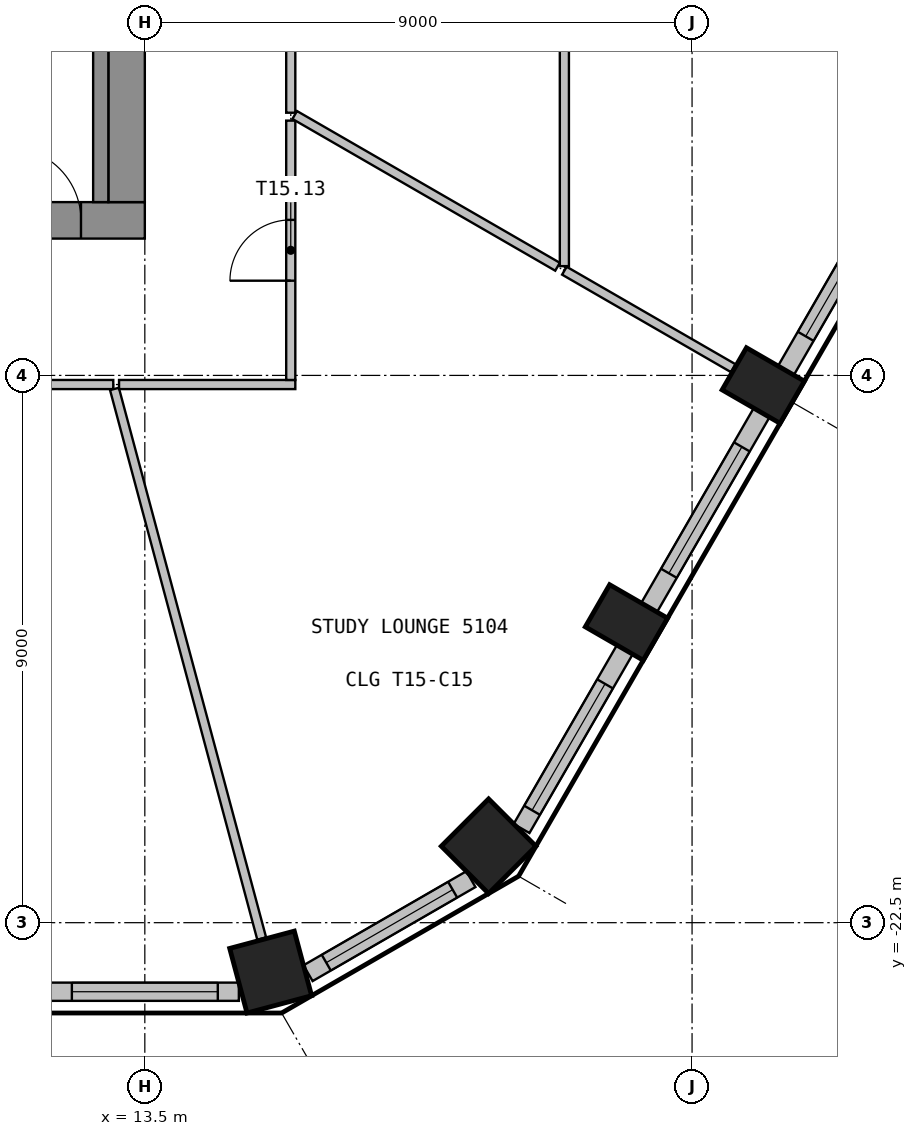
"""IFC4 building model, lengths in metres.
Left out: names, types, materials, properties, quantities, classifications, styles, units other than length and angle.
Written with IfcOpenShell. Run it as: python <this file> out.ifc"""

import sys

from ifc_helpers import new_model, si_unit, direction, frame, frame_2d, origin, origin_2d, place, context, subcontext, project, spatial, rectangle, extrude, element, fill, save


model = new_model("IFC4")
c1 = context("Model", 3, precision=1e-05, world=origin(), true_north=direction((0.0, 1.0)))
c2 = subcontext(c1, "Body", "Model", "MODEL_VIEW")
j1 = project(units=[si_unit("LENGTHUNIT", "METRE"), si_unit("PLANEANGLEUNIT", "RADIAN")], contexts=[c1])
p1 = place(None, origin())
s1 = spatial("IfcSite", under=j1, at=p1, CompositionType="ELEMENT")
p2 = place(p1, origin())
s2 = spatial("IfcBuilding", under=s1, at=p2, CompositionType="ELEMENT")
p3 = place(p2, frame((0.0, 0.0, 207.3)))
s3 = spatial("IfcBuildingStorey", under=s2, at=p3, CompositionType="ELEMENT", Elevation=207.3)
for number, where, z_axis, x_axis in (
    (1, (15.57, -23.312, 0.0), (0.0, 0.0, 1.0), (0.966, 0.259, 0.0)),
    (2, (19.154, -21.242, 0.0), (0.0, 0.0, 1.0), (0.707, 0.707, 0.0)),
):
    element("IfcColumn", number, at=place(p3, frame(where, z_axis=z_axis, x_axis=x_axis)), inside=s3, PredefinedType="COLUMN", context=c2, shape_type="SweptSolid", body=[
        extrude(rectangle(XDim=1.1, YDim=1.1, at=origin_2d()), origin(), (0.0, 0.0, 1.0), 3.55),
    ])
for number, where, z_axis, x_axis in (
    (3, (21.421, -17.563, 0.0), (0.0, 0.0, 1.0), (0.5, 0.866, 0.0)),
    (4, (23.671, -13.666, 0.0), (0.0, 0.0, 1.0), (0.5, 0.866, 0.0)),
):
    element("IfcColumn", number, at=place(p3, frame(where, z_axis=z_axis, x_axis=x_axis)), inside=s3, PredefinedType="COLUMN", context=c2, shape_type="SweptSolid", body=[
        extrude(rectangle(XDim=0.8, YDim=1.1, at=origin_2d()), origin(), (0.0, 0.0, 1.0), 3.55),
    ])
p4 = place(p3, frame((11.65, -23.635, 0.0), z_axis=(0.0, 0.0, 1.0), x_axis=(1.0, 0.0, 0.0)))
e5 = element("IfcWall", 5, at=p4, inside=s3, PredefinedType="SOLIDWALL", context=c2, shape_type="SweptSolid", body=[
    extrude(rectangle(XDim=3.396, YDim=0.3, at=frame_2d((1.698, 0.0))), origin(), (0.0, 0.0, 1.0), 3.55),
])
p5 = place(p4, frame((0.649, 0.0, 0.9)))
e6 = element("IfcOpeningElement", 6, at=p5, cuts=e5, PredefinedType="OPENING", context=c2, shape_type="SweptSolid", body=[
    extrude(rectangle(XDim=2.4, YDim=2.1, at=frame_2d((1.2, 1.05))), frame((0.0, 0.16, 0.0), z_axis=(0.0, -1.0, 0.0), x_axis=(1.0, 0.0, 0.0)), (0.0, 0.0, 1.0), 0.32),
])
p6 = place(p3, frame((16.184, -23.331, 0.0), z_axis=(0.0, 0.0, 1.0), x_axis=(0.865994975416, 0.500052699777, 0.0)))
e7 = element("IfcWall", 7, at=p6, inside=s3, PredefinedType="SOLIDWALL", context=c2, shape_type="SweptSolid", body=[
    extrude(rectangle(XDim=3.093, YDim=0.3, at=frame_2d((1.546, 0.0))), origin(), (0.0, 0.0, 1.0), 3.55),
])
p7 = place(p6, frame((0.346, 0.0, 0.9)))
e8 = element("IfcOpeningElement", 8, at=p7, cuts=e7, PredefinedType="OPENING", context=c2, shape_type="SweptSolid", body=[
    extrude(rectangle(XDim=2.4, YDim=2.1, at=frame_2d((1.2, 1.05))), frame((0.0, 0.16, 0.0), z_axis=(0.0, -1.0, 0.0), x_axis=(1.0, 0.0, 0.0)), (0.0, 0.0, 1.0), 0.32),
])
p8 = place(p3, frame((19.696, -20.951, 0.0), z_axis=(0.0, 0.0, 1.0), x_axis=(0.500012868213, 0.866017974191, 0.0)))
e9 = element("IfcWall", 9, at=p8, inside=s3, PredefinedType="SOLIDWALL", context=c2, shape_type="SweptSolid", body=[
    extrude(rectangle(XDim=3.396, YDim=0.3, at=frame_2d((1.698, 0.0))), origin(), (0.0, 0.0, 1.0), 3.55),
])
p9 = place(p8, frame((0.346, 0.0, 0.9)))
e10 = element("IfcOpeningElement", 10, at=p9, cuts=e9, PredefinedType="OPENING", context=c2, shape_type="SweptSolid", body=[
    extrude(rectangle(XDim=2.4, YDim=2.1, at=frame_2d((1.2, 1.05))), frame((0.0, 0.16, 0.0), z_axis=(0.0, -1.0, 0.0), x_axis=(1.0, 0.0, 0.0)), (0.0, 0.0, 1.0), 0.32),
])
p10 = place(p3, frame((21.794, -17.317, 0.0), z_axis=(0.0, 0.0, 1.0), x_axis=(0.500029062817, 0.866008623709, 0.0)))
e11 = element("IfcWall", 11, at=p10, inside=s3, PredefinedType="SOLIDWALL", context=c2, shape_type="SweptSolid", body=[
    extrude(rectangle(XDim=3.699, YDim=0.3, at=frame_2d((1.85, 0.0))), origin(), (0.0, 0.0, 1.0), 3.55),
])
p11 = place(p10, frame((0.649, 0.0, 0.9)))
e12 = element("IfcOpeningElement", 12, at=p11, cuts=e11, PredefinedType="OPENING", context=c2, shape_type="SweptSolid", body=[
    extrude(rectangle(XDim=2.4, YDim=2.1, at=frame_2d((1.2, 1.05))), frame((0.0, 0.16, 0.0), z_axis=(0.0, -1.0, 0.0), x_axis=(1.0, 0.0, 0.0)), (0.0, 0.0, 1.0), 0.32),
])
p12 = place(p3, frame((24.044, -13.419, 0.0), z_axis=(0.0, 0.0, 1.0), x_axis=(0.500029062817, 0.866008623709, 0.0)))
e13 = element("IfcWall", 13, at=p12, inside=s3, PredefinedType="SOLIDWALL", context=c2, shape_type="SweptSolid", body=[
    extrude(rectangle(XDim=3.699, YDim=0.3, at=frame_2d((1.85, 0.0))), origin(), (0.0, 0.0, 1.0), 3.55),
])
p13 = place(p12, frame((0.649, 0.0, 0.9)))
e14 = element("IfcOpeningElement", 14, at=p13, cuts=e13, PredefinedType="OPENING", context=c2, shape_type="SweptSolid", body=[
    extrude(rectangle(XDim=2.4, YDim=2.1, at=frame_2d((1.2, 1.05))), frame((0.0, 0.16, 0.0), z_axis=(0.0, -1.0, 0.0), x_axis=(1.0, 0.0, 0.0)), (0.0, 0.0, 1.0), 0.32),
])
p14 = place(p3, frame((-13.5, -10.95, 0.0), z_axis=(0.0, 0.0, 1.0), x_axis=(1.0, 0.0, 0.0)))
e15 = element("IfcWall", 15, at=p14, inside=s3, PredefinedType="SHEAR", context=c2, shape_type="SweptSolid", body=[
    extrude(rectangle(XDim=27.0, YDim=0.6, at=frame_2d((13.5, 0.0))), origin(), (0.0, 0.0, 1.0), 3.55),
])
p15 = place(p14, frame((12.3, 0.0, 0.0)))
e16 = element("IfcOpeningElement", 16, at=p15, cuts=e15, PredefinedType="OPENING", context=c2, shape_type="SweptSolid", body=[
    extrude(rectangle(XDim=2.4, YDim=2.1, at=frame_2d((1.2, 1.05))), frame((0.0, 0.31, 0.0), z_axis=(0.0, -1.0, 0.0), x_axis=(1.0, 0.0, 0.0)), (0.0, 0.0, 1.0), 0.62),
])
p16 = place(p14, frame((1.05, 0.0, 0.0)))
e17 = element("IfcOpeningElement", 17, at=p16, cuts=e15, PredefinedType="OPENING", context=c2, shape_type="SweptSolid", body=[
    extrude(rectangle(XDim=1.2, YDim=2.1, at=frame_2d((0.6, 1.05))), frame((0.0, 0.31, 0.0), z_axis=(0.0, -1.0, 0.0), x_axis=(1.0, 0.0, 0.0)), (0.0, 0.0, 1.0), 0.62),
])
p17 = place(p14, frame((24.75, 0.0, 0.0)))
e18 = element("IfcOpeningElement", 18, at=p17, cuts=e15, PredefinedType="OPENING", context=c2, shape_type="SweptSolid", body=[
    extrude(rectangle(XDim=1.2, YDim=2.1, at=frame_2d((0.6, 1.05))), frame((0.0, 0.31, 0.0), z_axis=(0.0, -1.0, 0.0), x_axis=(1.0, 0.0, 0.0)), (0.0, 0.0, 1.0), 0.62),
])
p18 = place(p3, frame((13.2, -10.65, 0.0), z_axis=(0.0, 0.0, 1.0), x_axis=(0.0, 1.0, 0.0)))
e19 = element("IfcWall", 19, at=p18, inside=s3, PredefinedType="SHEAR", context=c2, shape_type="SweptSolid", body=[
    extrude(rectangle(XDim=21.3, YDim=0.6, at=frame_2d((10.65, 0.0))), origin(), (0.0, 0.0, 1.0), 3.55),
])
p19 = place(p18, frame((9.45, 0.0, 0.0)))
e20 = element("IfcOpeningElement", 20, at=p19, cuts=e19, PredefinedType="OPENING", context=c2, shape_type="SweptSolid", body=[
    extrude(rectangle(XDim=2.4, YDim=2.1, at=frame_2d((1.2, 1.05))), frame((0.0, 0.31, 0.0), z_axis=(0.0, -1.0, 0.0), x_axis=(1.0, 0.0, 0.0)), (0.0, 0.0, 1.0), 0.62),
])
p20 = place(p3, frame((12.775, -10.65, 0.0), z_axis=(0.0, 0.0, 1.0), x_axis=(0.0, 1.0, 0.0)))
e21 = element("IfcWall", 21, at=p20, inside=s3, PredefinedType="SHEAR", context=c2, shape_type="SweptSolid", body=[
    extrude(rectangle(XDim=3.25, YDim=0.25, at=frame_2d((1.625, 0.0))), origin(), (0.0, 0.0, 1.0), 3.55),
])
p21 = place(p3, frame((2.25, -13.65, 0.0), z_axis=(0.0, 0.0, 1.0), x_axis=(1.0, 0.0, 0.0)))
e22 = element("IfcWall", 22, at=p21, inside=s3, PredefinedType="PARTITIONING", context=c2, shape_type="SweptSolid", body=[
    extrude(rectangle(XDim=10.731, YDim=0.15, at=frame_2d((5.365, 0.0))), origin(), (0.0, 0.0, 1.0), 3.55),
])
p22 = place(p21, frame((4.865, 0.0, 0.0)))
e23 = element("IfcOpeningElement", 23, at=p22, cuts=e22, PredefinedType="OPENING", context=c2, shape_type="SweptSolid", body=[
    extrude(rectangle(XDim=1.0, YDim=2.1, at=frame_2d((0.5, 1.05))), frame((0.0, 0.085, 0.0), z_axis=(0.0, -1.0, 0.0), x_axis=(1.0, 0.0, 0.0)), (0.0, 0.0, 1.0), 0.17),
])
p23 = place(p3, frame((13.0, -13.722, 0.0), z_axis=(0.0, 0.0, 1.0), x_axis=(0.258812157425, -0.96592767181, 0.0)))
e24 = element("IfcWall", 24, at=p23, inside=s3, PredefinedType="PARTITIONING", context=c2, shape_type="SweptSolid", body=[
    extrude(rectangle(XDim=9.358, YDim=0.15, at=frame_2d((4.679, 0.0))), origin(), (0.0, 0.0, 1.0), 3.55),
])
p24 = place(p3, frame((13.076, -13.65, 0.0), z_axis=(0.0, 0.0, 1.0), x_axis=(1.0, 0.0, 0.0)))
e25 = element("IfcWall", 25, at=p24, inside=s3, PredefinedType="PARTITIONING", context=c2, shape_type="SweptSolid", body=[
    extrude(rectangle(XDim=2.899, YDim=0.15, at=frame_2d((1.45, 0.0))), origin(), (0.0, 0.0, 1.0), 3.55),
])
p25 = place(p3, frame((15.9, -13.575, 0.0), z_axis=(0.0, 0.0, 1.0), x_axis=(0.0, 1.0, 0.0)))
e26 = element("IfcWall", 26, at=p25, inside=s3, PredefinedType="PARTITIONING", context=c2, shape_type="SweptSolid", body=[
    extrude(rectangle(XDim=4.265, YDim=0.15, at=frame_2d((2.132, 0.0))), origin(), (0.0, 0.0, 1.0), 3.55),
])
p26 = place(p25, frame((1.633, 0.0, 0.0)))
e27 = element("IfcOpeningElement", 27, at=p26, cuts=e26, PredefinedType="OPENING", context=c2, shape_type="SweptSolid", body=[
    extrude(rectangle(XDim=1.0, YDim=2.1, at=frame_2d((0.5, 1.05))), frame((0.0, 0.085, 0.0), z_axis=(0.0, -1.0, 0.0), x_axis=(1.0, 0.0, 0.0)), (0.0, 0.0, 1.0), 0.17),
])
p27 = place(p3, frame((15.9, -9.18, 0.0), z_axis=(0.0, 0.0, 1.0), x_axis=(0.0, 1.0, 0.0)))
e28 = element("IfcWall", 28, at=p27, inside=s3, PredefinedType="PARTITIONING", context=c2, shape_type="SweptSolid", body=[
    extrude(rectangle(XDim=7.005, YDim=0.15, at=frame_2d((3.502, 0.0))), origin(), (0.0, 0.0, 1.0), 3.55),
])
p28 = place(p27, frame((3.002, 0.0, 0.0)))
e29 = element("IfcOpeningElement", 29, at=p28, cuts=e28, PredefinedType="OPENING", context=c2, shape_type="SweptSolid", body=[
    extrude(rectangle(XDim=1.0, YDim=2.1, at=frame_2d((0.5, 1.05))), frame((0.0, 0.085, 0.0), z_axis=(0.0, -1.0, 0.0), x_axis=(1.0, 0.0, 0.0)), (0.0, 0.0, 1.0), 0.17),
])
p29 = place(p3, frame((15.965, -9.218, 0.0), z_axis=(0.0, 0.0, 1.0), x_axis=(0.866034070548, -0.499984988425, 0.0)))
e30 = element("IfcWall", 30, at=p29, inside=s3, PredefinedType="PARTITIONING", context=c2, shape_type="SweptSolid", body=[
    extrude(rectangle(XDim=4.991, YDim=0.15, at=frame_2d((2.496, 0.0))), origin(), (0.0, 0.0, 1.0), 3.55),
])
p30 = place(p3, frame((20.4, -2.325, 0.0), z_axis=(0.0, 0.0, 1.0), x_axis=(0.0, -1.0, 0.0)))
e31 = element("IfcWall", 31, at=p30, inside=s3, PredefinedType="PARTITIONING", context=c2, shape_type="SweptSolid", body=[
    extrude(rectangle(XDim=9.378, YDim=0.15, at=frame_2d((4.689, 0.0))), origin(), (0.0, 0.0, 1.0), 3.55),
])
p31 = place(p3, frame((20.4, -11.778, 0.0), z_axis=(0.0, 0.0, 1.0), x_axis=(0.866089241828, -0.499889412961, 0.0)))
e32 = element("IfcWall", 32, at=p31, inside=s3, PredefinedType="PARTITIONING", context=c2, shape_type="SweptSolid", body=[
    extrude(rectangle(XDim=3.207, YDim=0.15, at=frame_2d((1.604, 0.0))), origin(), (0.0, 0.0, 1.0), 3.55),
])
p32 = place(p5, origin())
e33 = element("IfcWindow", 33, at=p32, inside=s3, PartitioningType="SINGLE_PANEL", PredefinedType="WINDOW", context=c2, shape_type="SweptSolid", body=[
    extrude(rectangle(XDim=2.4, YDim=2.1, at=frame_2d((1.2, 1.05))), frame((0.0, 0.03, 0.0), z_axis=(0.0, -1.0, 0.0), x_axis=(1.0, 0.0, 0.0)), (0.0, 0.0, 1.0), 0.06),
])
fill(e6, e33)
p33 = place(p7, origin())
e34 = element("IfcWindow", 34, at=p33, inside=s3, PartitioningType="SINGLE_PANEL", PredefinedType="WINDOW", context=c2, shape_type="SweptSolid", body=[
    extrude(rectangle(XDim=2.4, YDim=2.1, at=frame_2d((1.2, 1.05))), frame((0.0, 0.03, 0.0), z_axis=(0.0, -1.0, 0.0), x_axis=(1.0, 0.0, 0.0)), (0.0, 0.0, 1.0), 0.06),
])
fill(e8, e34)
p34 = place(p9, origin())
e35 = element("IfcWindow", 35, at=p34, inside=s3, PartitioningType="SINGLE_PANEL", PredefinedType="WINDOW", context=c2, shape_type="SweptSolid", body=[
    extrude(rectangle(XDim=2.4, YDim=2.1, at=frame_2d((1.2, 1.05))), frame((0.0, 0.03, 0.0), z_axis=(0.0, -1.0, 0.0), x_axis=(1.0, 0.0, 0.0)), (0.0, 0.0, 1.0), 0.06),
])
fill(e10, e35)
p35 = place(p11, origin())
e36 = element("IfcWindow", 36, at=p35, inside=s3, PartitioningType="SINGLE_PANEL", PredefinedType="WINDOW", context=c2, shape_type="SweptSolid", body=[
    extrude(rectangle(XDim=2.4, YDim=2.1, at=frame_2d((1.2, 1.05))), frame((0.0, 0.03, 0.0), z_axis=(0.0, -1.0, 0.0), x_axis=(1.0, 0.0, 0.0)), (0.0, 0.0, 1.0), 0.06),
])
fill(e12, e36)
p36 = place(p13, origin())
e37 = element("IfcWindow", 37, at=p36, inside=s3, PartitioningType="SINGLE_PANEL", PredefinedType="WINDOW", context=c2, shape_type="SweptSolid", body=[
    extrude(rectangle(XDim=2.4, YDim=2.1, at=frame_2d((1.2, 1.05))), frame((0.0, 0.03, 0.0), z_axis=(0.0, -1.0, 0.0), x_axis=(1.0, 0.0, 0.0)), (0.0, 0.0, 1.0), 0.06),
])
fill(e14, e37)
p37 = place(p17, origin())
e38 = element("IfcDoor", 38, at=p37, inside=s3, OperationType="SINGLE_SWING_RIGHT", PredefinedType="DOOR", context=c2, shape_type="SweptSolid", body=[
    extrude(rectangle(XDim=1.2, YDim=2.1, at=frame_2d((0.6, 1.05))), frame((0.0, 0.025, 0.0), z_axis=(0.0, -1.0, 0.0), x_axis=(1.0, 0.0, 0.0)), (0.0, 0.0, 1.0), 0.05),
])
fill(e18, e38)
p38 = place(p26, origin())
e39 = element("IfcDoor", 39, at=p38, inside=s3, OperationType="SINGLE_SWING_RIGHT", PredefinedType="DOOR", context=c2, shape_type="SweptSolid", body=[
    extrude(rectangle(XDim=1.0, YDim=2.1, at=frame_2d((0.5, 1.05))), frame((0.0, 0.025, 0.0), z_axis=(0.0, -1.0, 0.0), x_axis=(1.0, 0.0, 0.0)), (0.0, 0.0, 1.0), 0.05),
])
fill(e27, e39)
save(model, sys.argv[1])
